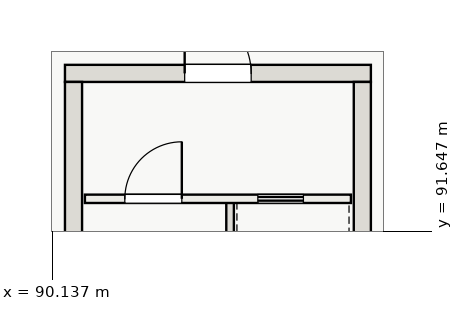
"""IFC4 building model, lengths in metres.
Left out: names, types, materials, properties, quantities, classifications, styles, units other than length and angle.
Written with IfcOpenShell. Run it as: python <this file> out.ifc"""

import sys

from ifc_helpers import new_model, si_unit, direction, frame, frame_2d, origin, place, context, subcontext, project, spatial, rectangle, extrude, element, fill, save


model = new_model("IFC4")
c1 = context("Model", 3, precision=1e-05, world=origin(), true_north=direction((0.0, 1.0)))
c2 = subcontext(c1, "Body", "Model", "MODEL_VIEW")
j1 = project(units=[si_unit("LENGTHUNIT", "METRE"), si_unit("PLANEANGLEUNIT", "RADIAN")], contexts=[c1])
p1 = place(None, origin())
s1 = spatial("IfcSite", under=j1, at=p1, CompositionType="ELEMENT")
p2 = place(p1, origin())
s2 = spatial("IfcBuilding", under=s1, at=p2, CompositionType="ELEMENT")
p3 = place(p2, origin())
s3 = spatial("IfcBuildingStorey", under=s2, at=p3, CompositionType="ELEMENT", Elevation=0.0)
p4 = place(p3, frame((90.475, 95.8, 0.0), z_axis=(0.0, 0.0, 1.0), x_axis=(1.0, 0.0, 0.0)))
e1 = element("IfcWall", 1, at=p4, inside=s3, PredefinedType="SHEAR", context=c2, shape_type="SweptSolid", body=[
    extrude(rectangle(XDim=8.05, YDim=0.45, at=frame_2d((4.025, 0.0))), origin(), (0.0, 0.0, 1.0), 6.0),
])
p5 = place(p4, frame((3.15, 0.0, 0.0)))
e2 = element("IfcOpeningElement", 2, at=p5, cuts=e1, PredefinedType="OPENING", context=c2, shape_type="SweptSolid", body=[
    extrude(rectangle(XDim=1.75, YDim=2.3, at=frame_2d((0.875, 1.15))), frame((0.0, 0.235, 0.0), z_axis=(0.0, -1.0, 0.0), x_axis=(1.0, 0.0, 0.0)), (0.0, 0.0, 1.0), 0.47),
])
for number, where, z_axis, x_axis in (
    (3, (90.7, 84.425, 0.0), (0.0, 0.0, 1.0), (0.0, 1.0, 0.0)),
    (4, (98.3, 84.425, 0.0), (0.0, 0.0, 1.0), (0.0, 1.0, 0.0)),
):
    element("IfcWall", number, at=place(p3, frame(where, z_axis=z_axis, x_axis=x_axis)), inside=s3, PredefinedType="SHEAR", context=c2, shape_type="SweptSolid", body=[
        extrude(rectangle(XDim=11.15, YDim=0.45, at=frame_2d((5.575, 0.0))), origin(), (0.0, 0.0, 1.0), 6.0),
    ])
p6 = place(p3, frame((94.82, 84.45, 0.0), z_axis=(0.0, 0.0, 1.0), x_axis=(0.0, 1.0, 0.0)))
e5 = element("IfcWall", 5, at=p6, inside=s3, PredefinedType="SOLIDWALL", context=c2, shape_type="SweptSolid", body=[
    extrude(rectangle(XDim=8.0, YDim=0.2, at=frame_2d((4.0, 0.0))), origin(), (0.0, 0.0, 1.0), 6.0),
])
p7 = place(p3, frame((91.0, 92.5, 0.0), z_axis=(0.0, 0.0, 1.0), x_axis=(1.0, 0.0, 0.0)))
e6 = element("IfcWall", 6, at=p7, inside=s3, PredefinedType="SOLIDWALL", context=c2, shape_type="SweptSolid", body=[
    extrude(rectangle(XDim=7.0, YDim=0.22, at=frame_2d((3.5, 0.0))), origin(), (0.0, 0.0, 1.0), 5.68),
])
p8 = place(p7, frame((1.05, 0.0, 0.0)))
e7 = element("IfcOpeningElement", 7, at=p8, cuts=e6, PredefinedType="OPENING", context=c2, shape_type="SweptSolid", body=[
    extrude(rectangle(XDim=1.5, YDim=2.2, at=frame_2d((0.75, 1.1))), frame((0.0, 0.12, 0.0), z_axis=(0.0, -1.0, 0.0), x_axis=(1.0, 0.0, 0.0)), (0.0, 0.0, 1.0), 0.24),
])
p9 = place(p7, frame((4.55, 0.0, 0.0)))
e8 = element("IfcOpeningElement", 8, at=p9, cuts=e6, PredefinedType="OPENING", context=c2, shape_type="SweptSolid", body=[
    extrude(rectangle(XDim=1.2, YDim=2.2, at=frame_2d((0.6, 1.1))), frame((0.0, 0.12, 0.0), z_axis=(0.0, -1.0, 0.0), x_axis=(1.0, 0.0, 0.0)), (0.0, 0.0, 1.0), 0.24),
])
p10 = place(p8, origin())
e9 = element("IfcDoor", 9, at=p10, inside=s3, OperationType="SINGLE_SWING_RIGHT", PredefinedType="DOOR", context=c2, shape_type="SweptSolid", body=[
    extrude(rectangle(XDim=1.5, YDim=2.2, at=frame_2d((0.75, 1.1))), frame((0.0, 0.025, 0.0), z_axis=(0.0, -1.0, 0.0), x_axis=(1.0, 0.0, 0.0)), (0.0, 0.0, 1.0), 0.05),
])
fill(e7, e9)
p11 = place(p9, origin())
e10 = element("IfcDoor", 10, at=p11, inside=s3, OperationType="SLIDING_TO_RIGHT", PredefinedType="DOOR", context=c2, shape_type="SweptSolid", body=[
    extrude(rectangle(XDim=1.2, YDim=2.2, at=frame_2d((0.6, 1.1))), frame((0.0, 0.025, 0.0), z_axis=(0.0, -1.0, 0.0), x_axis=(1.0, 0.0, 0.0)), (0.0, 0.0, 1.0), 0.05),
])
fill(e8, e10)
p12 = place(p5, origin())
e11 = element("IfcDoor", 11, at=p12, inside=s3, OperationType="DOUBLE_DOOR_SINGLE_SWING", PredefinedType="DOOR", context=c2, shape_type="SweptSolid", body=[
    extrude(rectangle(XDim=1.75, YDim=2.3, at=frame_2d((0.875, 1.15))), frame((0.0, 0.025, 0.0), z_axis=(0.0, -1.0, 0.0), x_axis=(1.0, 0.0, 0.0)), (0.0, 0.0, 1.0), 0.05),
])
fill(e2, e11)
save(model, sys.argv[1])
